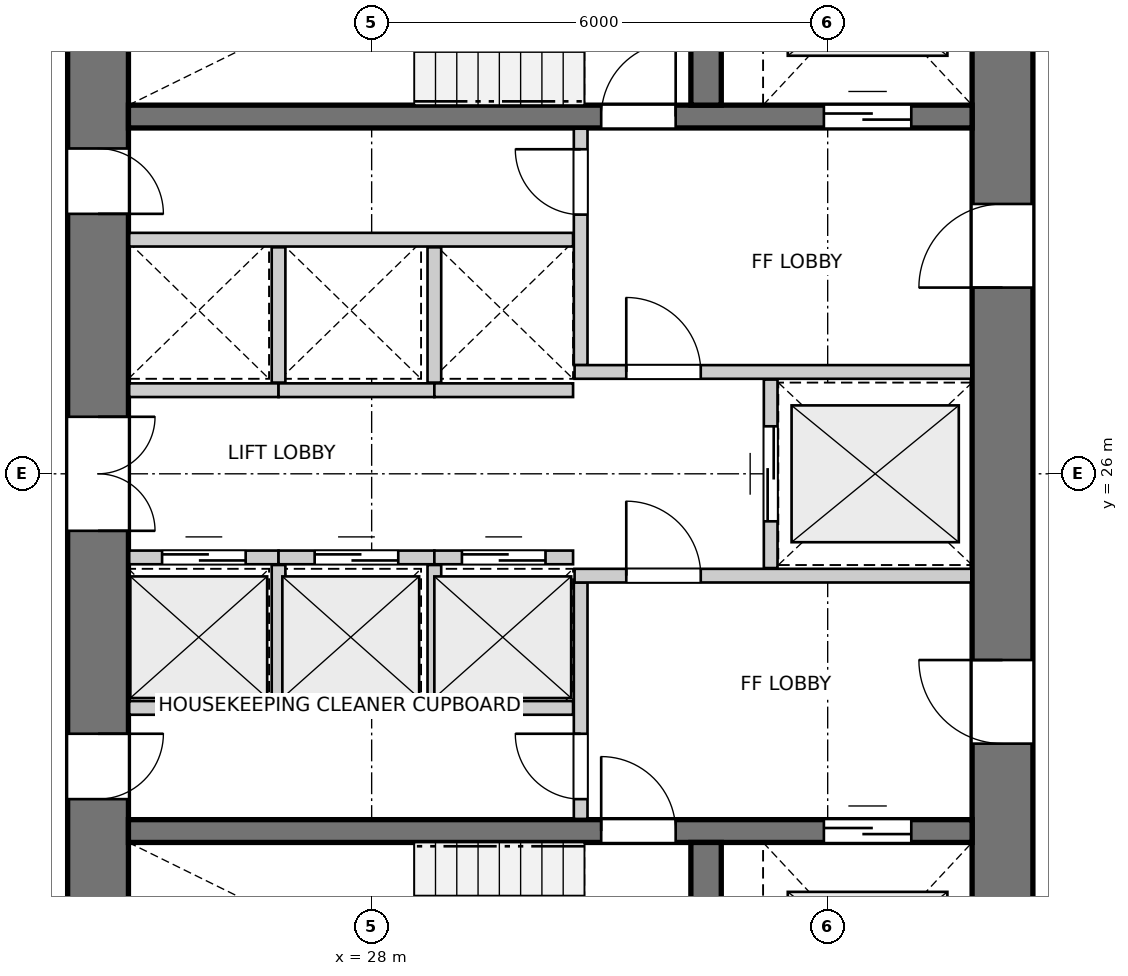
"""IFC4 building model, lengths in metres.
Left out: names, types, materials, properties, quantities, classifications, styles, units other than length and angle.
Written with IfcOpenShell. Run it as: python <this file> out.ifc"""

import sys

from ifc_helpers import new_model, si_unit, direction, frame, frame_2d, origin, place, context, subcontext, project, spatial, rectangle, extrude, source, transform, mapped, element, fill, save


model = new_model("IFC4")
c1 = context("Model", 3, precision=1e-05, world=origin(), true_north=direction((0.0, 1.0)))
c2 = subcontext(c1, "Body", "Model", "MODEL_VIEW")
j1 = project(units=[si_unit("LENGTHUNIT", "METRE"), si_unit("PLANEANGLEUNIT", "RADIAN")], contexts=[c1])
p1 = place(None, origin())
s1 = spatial("IfcSite", under=j1, at=p1, CompositionType="ELEMENT")
p2 = place(p1, origin())
s2 = spatial("IfcBuilding", under=s1, at=p2, CompositionType="ELEMENT")
p3 = place(p2, frame((0.0, 0.0, 43.0)))
s3 = spatial("IfcBuildingStorey", under=s2, at=p3, CompositionType="ELEMENT", Elevation=43.0)
p4 = place(p3, frame((24.4, 33.8, 0.0), z_axis=(0.0, 0.0, 1.0), x_axis=(0.0, -1.0, 0.0)))
e1 = element("IfcWall", 1, at=p4, inside=s3, PredefinedType="SHEAR", context=c2, shape_type="SweptSolid", body=[
    extrude(rectangle(XDim=15.6, YDim=0.8, at=frame_2d((7.8, 0.0))), origin(), (0.0, 0.0, 1.0), 2.94),
])
p5 = place(p4, frame((7.05, 0.0, 0.0)))
e2 = element("IfcOpeningElement", 2, at=p5, cuts=e1, PredefinedType="OPENING", context=c2, shape_type="SweptSolid", body=[
    extrude(rectangle(XDim=1.5, YDim=2.15, at=frame_2d((0.75, 1.075))), frame((0.0, 0.41, 0.0), z_axis=(0.0, -1.0, 0.0), x_axis=(1.0, 0.0, 0.0)), (0.0, 0.0, 1.0), 0.82),
])
p6 = place(p4, frame((3.52, 0.0, 0.0)))
e3 = element("IfcOpeningElement", 3, at=p6, cuts=e1, PredefinedType="OPENING", context=c2, shape_type="SweptSolid", body=[
    extrude(rectangle(XDim=0.86, YDim=2.05, at=frame_2d((0.43, 1.025))), frame((0.0, 0.41, 0.0), z_axis=(0.0, -1.0, 0.0), x_axis=(1.0, 0.0, 0.0)), (0.0, 0.0, 1.0), 0.82),
])
p7 = place(p4, frame((11.22, 0.0, 0.0)))
e4 = element("IfcOpeningElement", 4, at=p7, cuts=e1, PredefinedType="OPENING", context=c2, shape_type="SweptSolid", body=[
    extrude(rectangle(XDim=0.86, YDim=2.05, at=frame_2d((0.43, 1.025))), frame((0.0, 0.41, 0.0), z_axis=(0.0, -1.0, 0.0), x_axis=(1.0, 0.0, 0.0)), (0.0, 0.0, 1.0), 0.82),
])
p8 = place(p3, frame((36.3, 18.2, 0.0), z_axis=(0.0, 0.0, 1.0), x_axis=(0.0, 1.0, 0.0)))
e5 = element("IfcWall", 5, at=p8, inside=s3, PredefinedType="SHEAR", context=c2, shape_type="SweptSolid", body=[
    extrude(rectangle(XDim=15.6, YDim=0.8, at=frame_2d((7.8, 0.0))), origin(), (0.0, 0.0, 1.0), 2.94),
])
p9 = place(p8, frame((4.25, 0.0, 0.0)))
e6 = element("IfcOpeningElement", 6, at=p9, cuts=e5, PredefinedType="OPENING", context=c2, shape_type="SweptSolid", body=[
    extrude(rectangle(XDim=1.1, YDim=2.15, at=frame_2d((0.55, 1.075))), frame((0.0, 0.41, 0.0), z_axis=(0.0, -1.0, 0.0), x_axis=(1.0, 0.0, 0.0)), (0.0, 0.0, 1.0), 0.82),
])
p10 = place(p8, frame((10.25, 0.0, 0.0)))
e7 = element("IfcOpeningElement", 7, at=p10, cuts=e5, PredefinedType="OPENING", context=c2, shape_type="SweptSolid", body=[
    extrude(rectangle(XDim=1.1, YDim=2.15, at=frame_2d((0.55, 1.075))), frame((0.0, 0.41, 0.0), z_axis=(0.0, -1.0, 0.0), x_axis=(1.0, 0.0, 0.0)), (0.0, 0.0, 1.0), 0.82),
])
p11 = place(p3, frame((24.8, 21.3, 0.0), z_axis=(0.0, 0.0, 1.0), x_axis=(1.0, 0.0, 0.0)))
e8 = element("IfcWall", 8, at=p11, inside=s3, PredefinedType="SHEAR", context=c2, shape_type="SweptSolid", body=[
    extrude(rectangle(XDim=11.1, YDim=0.3, at=frame_2d((5.55, 0.0))), origin(), (0.0, 0.0, 1.0), 2.94),
])
p12 = place(p11, frame((6.22, 0.0, 0.0)))
e9 = element("IfcOpeningElement", 9, at=p12, cuts=e8, PredefinedType="OPENING", context=c2, shape_type="SweptSolid", body=[
    extrude(rectangle(XDim=0.98, YDim=2.15, at=frame_2d((0.49, 1.075))), frame((0.0, 0.16, 0.0), z_axis=(0.0, -1.0, 0.0), x_axis=(1.0, 0.0, 0.0)), (0.0, 0.0, 1.0), 0.32),
])
p13 = place(p11, frame((9.15, 0.0, 0.0)))
e10 = element("IfcOpeningElement", 10, at=p13, cuts=e8, PredefinedType="OPENING", context=c2, shape_type="SweptSolid", body=[
    extrude(rectangle(XDim=1.15, YDim=2.15, at=frame_2d((0.575, 1.075))), frame((0.0, 0.16, 0.0), z_axis=(0.0, -1.0, 0.0), x_axis=(1.0, 0.0, 0.0)), (0.0, 0.0, 1.0), 0.32),
])
p14 = place(p3, frame((32.4, 18.2, 0.0), z_axis=(0.0, 0.0, 1.0), x_axis=(0.0, 1.0, 0.0)))
e11 = element("IfcWall", 11, at=p14, inside=s3, PredefinedType="SHEAR", context=c2, shape_type="SweptSolid", body=[
    extrude(rectangle(XDim=2.95, YDim=0.4, at=frame_2d((1.475, 0.0))), origin(), (0.0, 0.0, 1.0), 2.94),
])
p15 = place(p3, frame((24.8, 30.7, 0.0), z_axis=(0.0, 0.0, 1.0), x_axis=(1.0, 0.0, 0.0)))
e12 = element("IfcWall", 12, at=p15, inside=s3, PredefinedType="SHEAR", context=c2, shape_type="SweptSolid", body=[
    extrude(rectangle(XDim=11.1, YDim=0.3, at=frame_2d((5.55, 0.0))), origin(), (0.0, 0.0, 1.0), 2.94),
])
p16 = place(p15, frame((6.22, 0.0, 0.0)))
e13 = element("IfcOpeningElement", 13, at=p16, cuts=e12, PredefinedType="OPENING", context=c2, shape_type="SweptSolid", body=[
    extrude(rectangle(XDim=0.98, YDim=2.15, at=frame_2d((0.49, 1.075))), frame((0.0, 0.16, 0.0), z_axis=(0.0, -1.0, 0.0), x_axis=(1.0, 0.0, 0.0)), (0.0, 0.0, 1.0), 0.32),
])
p17 = place(p15, frame((9.15, 0.0, 0.0)))
e14 = element("IfcOpeningElement", 14, at=p17, cuts=e12, PredefinedType="OPENING", context=c2, shape_type="SweptSolid", body=[
    extrude(rectangle(XDim=1.15, YDim=2.15, at=frame_2d((0.575, 1.075))), frame((0.0, 0.16, 0.0), z_axis=(0.0, -1.0, 0.0), x_axis=(1.0, 0.0, 0.0)), (0.0, 0.0, 1.0), 0.32),
])
p18 = place(p3, frame((32.4, 30.85, 0.0), z_axis=(0.0, 0.0, 1.0), x_axis=(0.0, 1.0, 0.0)))
e15 = element("IfcWall", 15, at=p18, inside=s3, PredefinedType="SHEAR", context=c2, shape_type="SweptSolid", body=[
    extrude(rectangle(XDim=2.95, YDim=0.4, at=frame_2d((1.475, 0.0))), origin(), (0.0, 0.0, 1.0), 2.94),
])
p19 = place(p3, frame((30.75, 21.46, 0.0), z_axis=(0.0, 0.0, 1.0), x_axis=(0.0, 1.0, 0.0)))
e16 = element("IfcWall", 16, at=p19, inside=s3, PredefinedType="PARTITIONING", context=c2, shape_type="SweptSolid", body=[
    extrude(rectangle(XDim=3.11, YDim=0.18, at=frame_2d((1.555, 0.0))), origin(), (0.0, 0.0, 1.0), 2.94),
])
p20 = place(p19, frame((0.26, 0.0, 0.0)))
e17 = element("IfcOpeningElement", 17, at=p20, cuts=e16, PredefinedType="OPENING", context=c2, shape_type="SweptSolid", body=[
    extrude(rectangle(XDim=0.86, YDim=2.05, at=frame_2d((0.43, 1.025))), frame((0.0, 0.1, 0.0), z_axis=(0.0, -1.0, 0.0), x_axis=(1.0, 0.0, 0.0)), (0.0, 0.0, 1.0), 0.2),
])
p21 = place(p3, frame((30.67, 24.66, 0.0), z_axis=(0.0, 0.0, 1.0), x_axis=(1.0, 0.0, 0.0)))
e18 = element("IfcWall", 18, at=p21, inside=s3, PredefinedType="PARTITIONING", context=c2, shape_type="SweptSolid", body=[
    extrude(rectangle(XDim=5.22, YDim=0.18, at=frame_2d((2.61, 0.0))), origin(), (0.0, 0.0, 1.0), 2.94),
])
p22 = place(p21, frame((0.68, 0.0, 0.0)))
e19 = element("IfcOpeningElement", 19, at=p22, cuts=e18, PredefinedType="OPENING", context=c2, shape_type="SweptSolid", body=[
    extrude(rectangle(XDim=0.98, YDim=2.15, at=frame_2d((0.49, 1.075))), frame((0.0, 0.1, 0.0), z_axis=(0.0, -1.0, 0.0), x_axis=(1.0, 0.0, 0.0)), (0.0, 0.0, 1.0), 0.2),
])
p23 = place(p3, frame((30.75, 27.43, 0.0), z_axis=(0.0, 0.0, 1.0), x_axis=(0.0, 1.0, 0.0)))
e20 = element("IfcWall", 20, at=p23, inside=s3, PredefinedType="PARTITIONING", context=c2, shape_type="SweptSolid", body=[
    extrude(rectangle(XDim=3.11, YDim=0.18, at=frame_2d((1.555, 0.0))), origin(), (0.0, 0.0, 1.0), 2.94),
])
p24 = place(p23, frame((1.98, 0.0, 0.0)))
e21 = element("IfcOpeningElement", 21, at=p24, cuts=e20, PredefinedType="OPENING", context=c2, shape_type="SweptSolid", body=[
    extrude(rectangle(XDim=0.86, YDim=2.05, at=frame_2d((0.43, 1.025))), frame((0.0, 0.1, 0.0), z_axis=(0.0, -1.0, 0.0), x_axis=(1.0, 0.0, 0.0)), (0.0, 0.0, 1.0), 0.2),
])
p25 = place(p3, frame((30.67, 27.34, 0.0), z_axis=(0.0, 0.0, 1.0), x_axis=(1.0, 0.0, 0.0)))
e22 = element("IfcWall", 22, at=p25, inside=s3, PredefinedType="PARTITIONING", context=c2, shape_type="SweptSolid", body=[
    extrude(rectangle(XDim=5.22, YDim=0.18, at=frame_2d((2.61, 0.0))), origin(), (0.0, 0.0, 1.0), 2.94),
])
p26 = place(p25, frame((0.68, 0.0, 0.0)))
e23 = element("IfcOpeningElement", 23, at=p26, cuts=e22, PredefinedType="OPENING", context=c2, shape_type="SweptSolid", body=[
    extrude(rectangle(XDim=0.98, YDim=2.15, at=frame_2d((0.49, 1.075))), frame((0.0, 0.1, 0.0), z_axis=(0.0, -1.0, 0.0), x_axis=(1.0, 0.0, 0.0)), (0.0, 0.0, 1.0), 0.2),
])
p27 = place(p3, frame((33.25, 24.76, 0.0), z_axis=(0.0, 0.0, 1.0), x_axis=(0.0, 1.0, 0.0)))
e24 = element("IfcWall", 24, at=p27, inside=s3, PredefinedType="PARTITIONING", context=c2, shape_type="SweptSolid", body=[
    extrude(rectangle(XDim=2.48, YDim=0.18, at=frame_2d((1.24, 0.0))), origin(), (0.0, 0.0, 1.0), 2.94),
])
p28 = place(p27, frame((0.615, 0.0, 0.0)))
e25 = element("IfcOpeningElement", 25, at=p28, cuts=e24, PredefinedType="OPENING", context=c2, shape_type="SweptSolid", body=[
    extrude(rectangle(XDim=1.25, YDim=2.15, at=frame_2d((0.625, 1.075))), frame((0.0, 0.1, 0.0), z_axis=(0.0, -1.0, 0.0), x_axis=(1.0, 0.0, 0.0)), (0.0, 0.0, 1.0), 0.2),
])
p29 = place(p3, frame((24.81, 22.92, 0.0), z_axis=(0.0, 0.0, 1.0), x_axis=(1.0, 0.0, 0.0)))
e26 = element("IfcWall", 26, at=p29, inside=s3, PredefinedType="PARTITIONING", context=c2, shape_type="SweptSolid", body=[
    extrude(rectangle(XDim=5.84, YDim=0.18, at=frame_2d((2.92, 0.0))), origin(), (0.0, 0.0, 1.0), 2.94),
])
p30 = place(p3, frame((24.81, 24.9, 0.0), z_axis=(0.0, 0.0, 1.0), x_axis=(1.0, 0.0, 0.0)))
e27 = element("IfcWall", 27, at=p30, inside=s3, PredefinedType="PARTITIONING", context=c2, shape_type="SweptSolid", body=[
    extrude(rectangle(XDim=1.965, YDim=0.18, at=frame_2d((0.982, 0.0))), origin(), (0.0, 0.0, 1.0), 2.94),
])
p31 = place(p30, frame((0.433, 0.0, 0.0)))
e28 = element("IfcOpeningElement", 28, at=p31, cuts=e27, PredefinedType="OPENING", context=c2, shape_type="SweptSolid", body=[
    extrude(rectangle(XDim=1.1, YDim=2.15, at=frame_2d((0.55, 1.075))), frame((0.0, 0.1, 0.0), z_axis=(0.0, -1.0, 0.0), x_axis=(1.0, 0.0, 0.0)), (0.0, 0.0, 1.0), 0.2),
])
p32 = place(p3, frame((26.775, 24.9, 0.0), z_axis=(0.0, 0.0, 1.0), x_axis=(1.0, 0.0, 0.0)))
e29 = element("IfcWall", 29, at=p32, inside=s3, PredefinedType="PARTITIONING", context=c2, shape_type="SweptSolid", body=[
    extrude(rectangle(XDim=2.05, YDim=0.18, at=frame_2d((1.025, 0.0))), origin(), (0.0, 0.0, 1.0), 2.94),
])
p33 = place(p32, frame((0.475, 0.0, 0.0)))
e30 = element("IfcOpeningElement", 30, at=p33, cuts=e29, PredefinedType="OPENING", context=c2, shape_type="SweptSolid", body=[
    extrude(rectangle(XDim=1.1, YDim=2.15, at=frame_2d((0.55, 1.075))), frame((0.0, 0.1, 0.0), z_axis=(0.0, -1.0, 0.0), x_axis=(1.0, 0.0, 0.0)), (0.0, 0.0, 1.0), 0.2),
])
p34 = place(p3, frame((26.775, 23.02, 0.0), z_axis=(0.0, 0.0, 1.0), x_axis=(0.0, 1.0, 0.0)))
e31 = element("IfcWall", 31, at=p34, inside=s3, PredefinedType="PARTITIONING", context=c2, shape_type="SweptSolid", body=[
    extrude(rectangle(XDim=1.78, YDim=0.18, at=frame_2d((0.89, 0.0))), origin(), (0.0, 0.0, 1.0), 2.94),
])
p35 = place(p3, frame((28.825, 24.9, 0.0), z_axis=(0.0, 0.0, 1.0), x_axis=(1.0, 0.0, 0.0)))
e32 = element("IfcWall", 32, at=p35, inside=s3, PredefinedType="PARTITIONING", context=c2, shape_type="SweptSolid", body=[
    extrude(rectangle(XDim=1.825, YDim=0.18, at=frame_2d((0.913, 0.0))), origin(), (0.0, 0.0, 1.0), 2.94),
])
p36 = place(p35, frame((0.363, 0.0, 0.0)))
e33 = element("IfcOpeningElement", 33, at=p36, cuts=e32, PredefinedType="OPENING", context=c2, shape_type="SweptSolid", body=[
    extrude(rectangle(XDim=1.1, YDim=2.15, at=frame_2d((0.55, 1.075))), frame((0.0, 0.1, 0.0), z_axis=(0.0, -1.0, 0.0), x_axis=(1.0, 0.0, 0.0)), (0.0, 0.0, 1.0), 0.2),
])
p37 = place(p3, frame((28.825, 23.02, 0.0), z_axis=(0.0, 0.0, 1.0), x_axis=(0.0, 1.0, 0.0)))
e34 = element("IfcWall", 34, at=p37, inside=s3, PredefinedType="PARTITIONING", context=c2, shape_type="SweptSolid", body=[
    extrude(rectangle(XDim=1.78, YDim=0.18, at=frame_2d((0.89, 0.0))), origin(), (0.0, 0.0, 1.0), 2.94),
])
p38 = place(p3, frame((24.81, 29.08, 0.0), z_axis=(0.0, 0.0, 1.0), x_axis=(1.0, 0.0, 0.0)))
e35 = element("IfcWall", 35, at=p38, inside=s3, PredefinedType="PARTITIONING", context=c2, shape_type="SweptSolid", body=[
    extrude(rectangle(XDim=5.84, YDim=0.18, at=frame_2d((2.92, 0.0))), origin(), (0.0, 0.0, 1.0), 2.94),
])
p39 = place(p3, frame((24.81, 27.1, 0.0), z_axis=(0.0, 0.0, 1.0), x_axis=(1.0, 0.0, 0.0)))
e36 = element("IfcWall", 36, at=p39, inside=s3, PredefinedType="PARTITIONING", context=c2, shape_type="SweptSolid", body=[
    extrude(rectangle(XDim=1.965, YDim=0.18, at=frame_2d((0.982, 0.0))), origin(), (0.0, 0.0, 1.0), 2.94),
])
p40 = place(p3, frame((26.775, 27.1, 0.0), z_axis=(0.0, 0.0, 1.0), x_axis=(1.0, 0.0, 0.0)))
e37 = element("IfcWall", 37, at=p40, inside=s3, PredefinedType="PARTITIONING", context=c2, shape_type="SweptSolid", body=[
    extrude(rectangle(XDim=2.05, YDim=0.18, at=frame_2d((1.025, 0.0))), origin(), (0.0, 0.0, 1.0), 2.94),
])
p41 = place(p3, frame((26.775, 27.2, 0.0), z_axis=(0.0, 0.0, 1.0), x_axis=(0.0, 1.0, 0.0)))
e38 = element("IfcWall", 38, at=p41, inside=s3, PredefinedType="PARTITIONING", context=c2, shape_type="SweptSolid", body=[
    extrude(rectangle(XDim=1.78, YDim=0.18, at=frame_2d((0.89, 0.0))), origin(), (0.0, 0.0, 1.0), 2.94),
])
p42 = place(p3, frame((28.825, 27.1, 0.0), z_axis=(0.0, 0.0, 1.0), x_axis=(1.0, 0.0, 0.0)))
e39 = element("IfcWall", 39, at=p42, inside=s3, PredefinedType="PARTITIONING", context=c2, shape_type="SweptSolid", body=[
    extrude(rectangle(XDim=1.825, YDim=0.18, at=frame_2d((0.913, 0.0))), origin(), (0.0, 0.0, 1.0), 2.94),
])
p43 = place(p3, frame((28.825, 27.2, 0.0), z_axis=(0.0, 0.0, 1.0), x_axis=(0.0, 1.0, 0.0)))
e40 = element("IfcWall", 40, at=p43, inside=s3, PredefinedType="PARTITIONING", context=c2, shape_type="SweptSolid", body=[
    extrude(rectangle(XDim=1.78, YDim=0.18, at=frame_2d((0.89, 0.0))), origin(), (0.0, 0.0, 1.0), 2.94),
])
m1 = source(origin(), c2, "Body", "SweptSolid", [
    extrude(rectangle(XDim=0.98, YDim=2.15, at=frame_2d((0.49, 1.075))), frame((0.0, 0.025, 0.0), z_axis=(0.0, -1.0, 0.0), x_axis=(1.0, 0.0, 0.0)), (0.0, 0.0, 1.0), 0.05),
])
p44 = place(p12, origin())
e41 = element("IfcDoor", 41, at=p44, inside=s3, OperationType="SINGLE_SWING_LEFT", PredefinedType="DOOR", context=c2, shape_type="MappedRepresentation", body=[
    mapped(m1, transform((0.0, 0.0, 0.0), x_axis=(1.0, 0.0, 0.0), y_axis=(0.0, 1.0, 0.0), z_axis=(0.0, 0.0, 1.0), scale=1.0)),
])
fill(e9, e41)
m2 = source(origin(), c2, "Body", "SweptSolid", [
    extrude(rectangle(XDim=1.15, YDim=2.15, at=frame_2d((0.575, 1.075))), frame((0.0, 0.025, 0.0), z_axis=(0.0, -1.0, 0.0), x_axis=(1.0, 0.0, 0.0)), (0.0, 0.0, 1.0), 0.05),
])
p45 = place(p13, origin())
e42 = element("IfcDoor", 42, at=p45, inside=s3, OperationType="DOUBLE_DOOR_SLIDING", PredefinedType="DOOR", context=c2, shape_type="MappedRepresentation", body=[
    mapped(m2, transform((0.0, 0.0, 0.0), x_axis=(1.0, 0.0, 0.0), y_axis=(0.0, 1.0, 0.0), z_axis=(0.0, 0.0, 1.0), scale=1.0)),
])
fill(e10, e42)
p46 = place(p16, origin())
e43 = element("IfcDoor", 43, at=p46, inside=s3, OperationType="SINGLE_SWING_RIGHT", PredefinedType="DOOR", context=c2, shape_type="MappedRepresentation", body=[
    mapped(m1, transform((0.0, 0.0, 0.0), x_axis=(1.0, 0.0, 0.0), y_axis=(0.0, 1.0, 0.0), z_axis=(0.0, 0.0, 1.0), scale=1.0)),
])
fill(e13, e43)
p47 = place(p17, origin())
e44 = element("IfcDoor", 44, at=p47, inside=s3, OperationType="DOUBLE_DOOR_SLIDING", PredefinedType="DOOR", context=c2, shape_type="MappedRepresentation", body=[
    mapped(m2, transform((0.0, 0.0, 0.0), x_axis=(1.0, 0.0, 0.0), y_axis=(0.0, 1.0, 0.0), z_axis=(0.0, 0.0, 1.0), scale=1.0)),
])
fill(e14, e44)
m3 = source(origin(), c2, "Body", "SweptSolid", [
    extrude(rectangle(XDim=1.1, YDim=2.15, at=frame_2d((0.55, 1.075))), frame((0.0, 0.025, 0.0), z_axis=(0.0, -1.0, 0.0), x_axis=(1.0, 0.0, 0.0)), (0.0, 0.0, 1.0), 0.05),
])
p48 = place(p9, origin())
e45 = element("IfcDoor", 45, at=p48, inside=s3, OperationType="SINGLE_SWING_RIGHT", PredefinedType="DOOR", context=c2, shape_type="MappedRepresentation", body=[
    mapped(m3, transform((0.0, 0.0, 0.0), x_axis=(1.0, 0.0, 0.0), y_axis=(0.0, 1.0, 0.0), z_axis=(0.0, 0.0, 1.0), scale=1.0)),
])
fill(e6, e45)
p49 = place(p10, origin())
e46 = element("IfcDoor", 46, at=p49, inside=s3, OperationType="SINGLE_SWING_LEFT", PredefinedType="DOOR", context=c2, shape_type="MappedRepresentation", body=[
    mapped(m3, transform((0.0, 0.0, 0.0), x_axis=(1.0, 0.0, 0.0), y_axis=(0.0, 1.0, 0.0), z_axis=(0.0, 0.0, 1.0), scale=1.0)),
])
fill(e7, e46)
m4 = source(origin(), c2, "Body", "SweptSolid", [
    extrude(rectangle(XDim=1.5, YDim=2.15, at=frame_2d((0.75, 1.075))), frame((0.0, 0.025, 0.0), z_axis=(0.0, -1.0, 0.0), x_axis=(1.0, 0.0, 0.0)), (0.0, 0.0, 1.0), 0.05),
])
p50 = place(p5, origin())
e47 = element("IfcDoor", 47, at=p50, inside=s3, OperationType="DOUBLE_DOOR_SINGLE_SWING", PredefinedType="DOOR", context=c2, shape_type="MappedRepresentation", body=[
    mapped(m4, transform((0.0, 0.0, 0.0), x_axis=(1.0, 0.0, 0.0), y_axis=(0.0, 1.0, 0.0), z_axis=(0.0, 0.0, 1.0), scale=1.0)),
])
fill(e2, e47)
m5 = source(origin(), c2, "Body", "SweptSolid", [
    extrude(rectangle(XDim=0.86, YDim=2.05, at=frame_2d((0.43, 1.025))), frame((0.0, 0.025, 0.0), z_axis=(0.0, -1.0, 0.0), x_axis=(1.0, 0.0, 0.0)), (0.0, 0.0, 1.0), 0.05),
])
p51 = place(p6, origin())
e48 = element("IfcDoor", 48, at=p51, inside=s3, OperationType="SINGLE_SWING_RIGHT", PredefinedType="DOOR", context=c2, shape_type="MappedRepresentation", body=[
    mapped(m5, transform((0.0, 0.0, 0.0), x_axis=(1.0, 0.0, 0.0), y_axis=(0.0, 1.0, 0.0), z_axis=(0.0, 0.0, 1.0), scale=1.0)),
])
fill(e3, e48)
p52 = place(p7, origin())
e49 = element("IfcDoor", 49, at=p52, inside=s3, OperationType="SINGLE_SWING_LEFT", PredefinedType="DOOR", context=c2, shape_type="MappedRepresentation", body=[
    mapped(m5, transform((0.0, 0.0, 0.0), x_axis=(1.0, 0.0, 0.0), y_axis=(0.0, 1.0, 0.0), z_axis=(0.0, 0.0, 1.0), scale=1.0)),
])
fill(e4, e49)
p53 = place(p20, origin())
e50 = element("IfcDoor", 50, at=p53, inside=s3, OperationType="SINGLE_SWING_RIGHT", PredefinedType="DOOR", context=c2, shape_type="MappedRepresentation", body=[
    mapped(m5, transform((0.0, 0.0, 0.0), x_axis=(1.0, 0.0, 0.0), y_axis=(0.0, 1.0, 0.0), z_axis=(0.0, 0.0, 1.0), scale=1.0)),
])
fill(e17, e50)
p54 = place(p22, origin())
e51 = element("IfcDoor", 51, at=p54, inside=s3, OperationType="SINGLE_SWING_LEFT", PredefinedType="DOOR", context=c2, shape_type="MappedRepresentation", body=[
    mapped(m1, transform((0.0, 0.0, 0.0), x_axis=(1.0, 0.0, 0.0), y_axis=(0.0, 1.0, 0.0), z_axis=(0.0, 0.0, 1.0), scale=1.0)),
])
fill(e19, e51)
p55 = place(p24, origin())
e52 = element("IfcDoor", 52, at=p55, inside=s3, OperationType="SINGLE_SWING_RIGHT", PredefinedType="DOOR", context=c2, shape_type="MappedRepresentation", body=[
    mapped(m5, transform((0.0, 0.0, 0.0), x_axis=(1.0, 0.0, 0.0), y_axis=(0.0, 1.0, 0.0), z_axis=(0.0, 0.0, 1.0), scale=1.0)),
])
fill(e21, e52)
p56 = place(p26, origin())
e53 = element("IfcDoor", 53, at=p56, inside=s3, OperationType="SINGLE_SWING_LEFT", PredefinedType="DOOR", context=c2, shape_type="MappedRepresentation", body=[
    mapped(m1, transform((0.0, 0.0, 0.0), x_axis=(1.0, 0.0, 0.0), y_axis=(0.0, 1.0, 0.0), z_axis=(0.0, 0.0, 1.0), scale=1.0)),
])
fill(e23, e53)
m6 = source(origin(), c2, "Body", "SweptSolid", [
    extrude(rectangle(XDim=1.25, YDim=2.15, at=frame_2d((0.625, 1.075))), frame((0.0, 0.025, 0.0), z_axis=(0.0, -1.0, 0.0), x_axis=(1.0, 0.0, 0.0)), (0.0, 0.0, 1.0), 0.05),
])
p57 = place(p28, origin())
e54 = element("IfcDoor", 54, at=p57, inside=s3, OperationType="DOUBLE_DOOR_SLIDING", PredefinedType="DOOR", context=c2, shape_type="MappedRepresentation", body=[
    mapped(m6, transform((0.0, 0.0, 0.0), x_axis=(1.0, 0.0, 0.0), y_axis=(0.0, 1.0, 0.0), z_axis=(0.0, 0.0, 1.0), scale=1.0)),
])
fill(e25, e54)
p58 = place(p31, origin())
e55 = element("IfcDoor", 55, at=p58, inside=s3, OperationType="DOUBLE_DOOR_SLIDING", PredefinedType="DOOR", context=c2, shape_type="MappedRepresentation", body=[
    mapped(m3, transform((0.0, 0.0, 0.0), x_axis=(1.0, 0.0, 0.0), y_axis=(0.0, 1.0, 0.0), z_axis=(0.0, 0.0, 1.0), scale=1.0)),
])
fill(e28, e55)
p59 = place(p33, origin())
e56 = element("IfcDoor", 56, at=p59, inside=s3, OperationType="DOUBLE_DOOR_SLIDING", PredefinedType="DOOR", context=c2, shape_type="MappedRepresentation", body=[
    mapped(m3, transform((0.0, 0.0, 0.0), x_axis=(1.0, 0.0, 0.0), y_axis=(0.0, 1.0, 0.0), z_axis=(0.0, 0.0, 1.0), scale=1.0)),
])
fill(e30, e56)
p60 = place(p36, origin())
e57 = element("IfcDoor", 57, at=p60, inside=s3, OperationType="DOUBLE_DOOR_SLIDING", PredefinedType="DOOR", context=c2, shape_type="MappedRepresentation", body=[
    mapped(m3, transform((0.0, 0.0, 0.0), x_axis=(1.0, 0.0, 0.0), y_axis=(0.0, 1.0, 0.0), z_axis=(0.0, 0.0, 1.0), scale=1.0)),
])
fill(e33, e57)
save(model, sys.argv[1])
